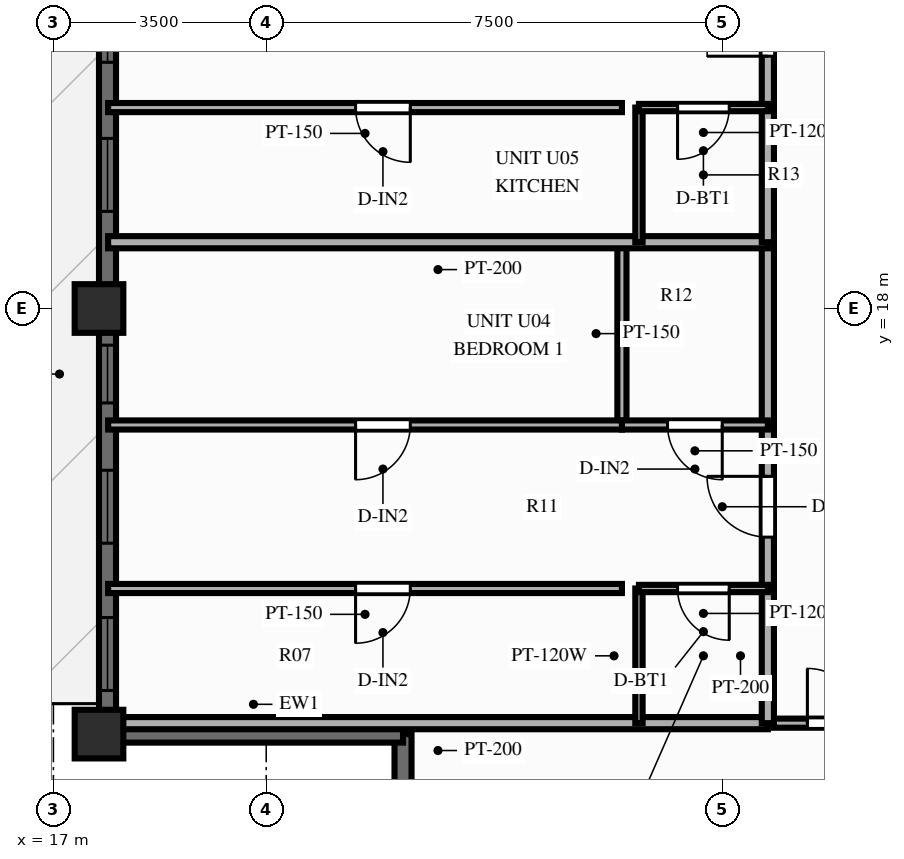
"""IFC4 building model, lengths in metres.
Left out: names, types, materials, properties, quantities, classifications, styles, units other than length and angle.
Written with IfcOpenShell. Run it as: python <this file> out.ifc"""

import sys

from ifc_helpers import new_model, si_unit, direction, frame, frame_2d, origin, origin_2d, place, context, subcontext, project, spatial, rectangle, extrude, source, transform, mapped, element, fill, save


model = new_model("IFC4")
c1 = context("Model", 3, precision=1e-05, world=origin(), true_north=direction((0.0, 1.0)))
c2 = subcontext(c1, "Body", "Model", "MODEL_VIEW")
j1 = project(units=[si_unit("LENGTHUNIT", "METRE"), si_unit("PLANEANGLEUNIT", "RADIAN")], contexts=[c1])
p1 = place(None, origin())
s1 = spatial("IfcSite", under=j1, at=p1, CompositionType="ELEMENT")
p2 = place(p1, origin())
s2 = spatial("IfcBuilding", under=s1, at=p2, CompositionType="ELEMENT")
p3 = place(p2, frame((0.0, 0.0, 189.7)))
s3 = spatial("IfcBuildingStorey", under=s2, at=p3, CompositionType="ELEMENT", Elevation=189.7)
m1 = source(origin(), c2, "Body", "SweptSolid", [
    extrude(rectangle(XDim=0.8, YDim=0.8, at=origin_2d()), origin(), (0.0, 0.0, 1.0), 3.0),
])
for number, where, z_axis, x_axis in (
    (1, (17.75, 18.0, 0.0), (0.0, 0.0, 1.0), (1.0, 0.0, 0.0)),
    (2, (17.75, 11.0, 0.0), (0.0, 0.0, 1.0), (1.0, 0.0, 0.0)),
):
    element("IfcColumn", number, at=place(p3, frame(where, z_axis=z_axis, x_axis=x_axis)), inside=s3, PredefinedType="COLUMN", context=c2, shape_type="MappedRepresentation", body=[
        mapped(m1, transform((0.0, 0.0, 0.0), scale=1.0)),
    ])
p4 = place(p3, frame((17.89, 11.0, 0.0), z_axis=(0.0, 0.0, 1.0), x_axis=(0.0, 1.0, 0.0)))
e3 = element("IfcWall", 3, at=p4, inside=s3, PredefinedType="SOLIDWALL", context=c2, shape_type="SweptSolid", body=[
    extrude(rectangle(XDim=32.0, YDim=0.28, at=frame_2d((16.0, 0.0))), origin(), (0.0, 0.0, 1.0), 2.28),
])
p5 = place(p4, frame((0.717, 0.0, 0.25)))
e4 = element("IfcOpeningElement", 4, at=p5, cuts=e3, PredefinedType="OPENING", context=c2, shape_type="SweptSolid", body=[
    extrude(rectangle(XDim=1.2, YDim=1.5, at=frame_2d((0.6, 0.75))), frame((0.0, 0.152, 0.0), z_axis=(0.0, -1.0, 0.0), x_axis=(1.0, 0.0, 0.0)), (0.0, 0.0, 1.0), 0.304),
])
p6 = place(p4, frame((3.139, 0.0, 0.25)))
e5 = element("IfcOpeningElement", 5, at=p6, cuts=e3, PredefinedType="OPENING", context=c2, shape_type="SweptSolid", body=[
    extrude(rectangle(XDim=1.2, YDim=1.5, at=frame_2d((0.6, 0.75))), frame((0.0, 0.152, 0.0), z_axis=(0.0, -1.0, 0.0), x_axis=(1.0, 0.0, 0.0)), (0.0, 0.0, 1.0), 0.304),
])
p7 = place(p4, frame((5.447, 0.0, 0.25)))
e6 = element("IfcOpeningElement", 6, at=p7, cuts=e3, PredefinedType="OPENING", context=c2, shape_type="SweptSolid", body=[
    extrude(rectangle(XDim=0.95, YDim=1.5, at=frame_2d((0.475, 0.75))), frame((0.0, 0.152, 0.0), z_axis=(0.0, -1.0, 0.0), x_axis=(1.0, 0.0, 0.0)), (0.0, 0.0, 1.0), 0.304),
])
p8 = place(p4, frame((8.597, 0.0, 0.25)))
e7 = element("IfcOpeningElement", 7, at=p8, cuts=e3, PredefinedType="OPENING", context=c2, shape_type="SweptSolid", body=[
    extrude(rectangle(XDim=1.2, YDim=1.5, at=frame_2d((0.6, 0.75))), frame((0.0, 0.152, 0.0), z_axis=(0.0, -1.0, 0.0), x_axis=(1.0, 0.0, 0.0)), (0.0, 0.0, 1.0), 0.304),
])
p9 = place(p4, frame((11.05, 0.0, 0.25)))
e8 = element("IfcOpeningElement", 8, at=p9, cuts=e3, PredefinedType="OPENING", context=c2, shape_type="SweptSolid", body=[
    extrude(rectangle(XDim=1.2, YDim=1.5, at=frame_2d((0.6, 0.75))), frame((0.0, 0.152, 0.0), z_axis=(0.0, -1.0, 0.0), x_axis=(1.0, 0.0, 0.0)), (0.0, 0.0, 1.0), 0.304),
])
p10 = place(p4, frame((13.697, 0.0, 0.0)))
e9 = element("IfcOpeningElement", 9, at=p10, cuts=e3, PredefinedType="OPENING", context=c2, shape_type="SweptSolid", body=[
    extrude(rectangle(XDim=1.6, YDim=2.15, at=frame_2d((0.8, 1.075))), frame((0.0, 0.152, 0.0), z_axis=(0.0, -1.0, 0.0), x_axis=(1.0, 0.0, 0.0)), (0.0, 0.0, 1.0), 0.304),
])
p11 = place(p4, frame((16.507, 0.0, 0.25)))
e10 = element("IfcOpeningElement", 10, at=p11, cuts=e3, PredefinedType="OPENING", context=c2, shape_type="SweptSolid", body=[
    extrude(rectangle(XDim=1.2, YDim=1.5, at=frame_2d((0.6, 0.75))), frame((0.0, 0.152, 0.0), z_axis=(0.0, -1.0, 0.0), x_axis=(1.0, 0.0, 0.0)), (0.0, 0.0, 1.0), 0.304),
])
p12 = place(p4, frame((18.959, 0.0, 0.25)))
e11 = element("IfcOpeningElement", 11, at=p12, cuts=e3, PredefinedType="OPENING", context=c2, shape_type="SweptSolid", body=[
    extrude(rectangle(XDim=1.2, YDim=1.5, at=frame_2d((0.6, 0.75))), frame((0.0, 0.152, 0.0), z_axis=(0.0, -1.0, 0.0), x_axis=(1.0, 0.0, 0.0)), (0.0, 0.0, 1.0), 0.304),
])
p13 = place(p4, frame((21.807, 0.0, 0.25)))
e12 = element("IfcOpeningElement", 12, at=p13, cuts=e3, PredefinedType="OPENING", context=c2, shape_type="SweptSolid", body=[
    extrude(rectangle(XDim=1.2, YDim=1.5, at=frame_2d((0.6, 0.75))), frame((0.0, 0.152, 0.0), z_axis=(0.0, -1.0, 0.0), x_axis=(1.0, 0.0, 0.0)), (0.0, 0.0, 1.0), 0.304),
])
p14 = place(p4, frame((26.967, 0.0, 0.25)))
e13 = element("IfcOpeningElement", 13, at=p14, cuts=e3, PredefinedType="OPENING", context=c2, shape_type="SweptSolid", body=[
    extrude(rectangle(XDim=1.2, YDim=1.5, at=frame_2d((0.6, 0.75))), frame((0.0, 0.152, 0.0), z_axis=(0.0, -1.0, 0.0), x_axis=(1.0, 0.0, 0.0)), (0.0, 0.0, 1.0), 0.304),
])
p15 = place(p4, frame((29.687, 0.0, 0.25)))
e14 = element("IfcOpeningElement", 14, at=p15, cuts=e3, PredefinedType="OPENING", context=c2, shape_type="SweptSolid", body=[
    extrude(rectangle(XDim=1.2, YDim=1.5, at=frame_2d((0.6, 0.75))), frame((0.0, 0.152, 0.0), z_axis=(0.0, -1.0, 0.0), x_axis=(1.0, 0.0, 0.0)), (0.0, 0.0, 1.0), 0.304),
])
for number, where, z_axis, x_axis in (
    (15, (22.75, 6.08, 0.0), (0.0, 0.0, 1.0), (0.0, 1.0, 0.0)),
    (16, (17.83, 11.0, 0.0), (0.0, 0.0, 1.0), (1.0, 0.0, 0.0)),
):
    element("IfcWall", number, at=place(p3, frame(where, z_axis=z_axis, x_axis=x_axis)), inside=s3, PredefinedType="SOLIDWALL", context=c2, shape_type="SweptSolid", body=[
        extrude(rectangle(XDim=4.92, YDim=0.28, at=frame_2d((2.46, 0.0))), origin(), (0.0, 0.0, 1.0), 2.28),
    ])
p16 = place(p3, frame((28.85, 11.18, 0.0), z_axis=(0.0, 0.0, 1.0), x_axis=(1.0, 0.0, 0.0)))
e17 = element("IfcWall", 17, at=p16, inside=s3, PredefinedType="PARTITIONING", context=c2, shape_type="SweptSolid", body=[
    extrude(rectangle(XDim=2.33, YDim=0.15, at=frame_2d((1.165, 0.0))), origin(), (0.0, 0.0, 1.0), 2.79),
])
p17 = place(p16, frame((0.55, 0.0, 0.0)))
e18 = element("IfcOpeningElement", 18, at=p17, cuts=e17, PredefinedType="OPENING", context=c2, shape_type="SweptSolid", body=[
    extrude(rectangle(XDim=0.9, YDim=2.1, at=frame_2d((0.45, 1.05))), frame((0.0, 0.087, 0.0), z_axis=(0.0, -1.0, 0.0), x_axis=(1.0, 0.0, 0.0)), (0.0, 0.0, 1.0), 0.174),
])
p18 = place(p3, frame((28.75, 11.18, 0.0), z_axis=(0.0, 0.0, 1.0), x_axis=(-1.0, 0.0, 0.0)))
e19 = element("IfcWall", 19, at=p18, inside=s3, PredefinedType="PARTITIONING", context=c2, shape_type="SweptSolid", body=[
    extrude(rectangle(XDim=10.85, YDim=0.2, at=frame_2d((5.425, 0.0))), origin(), (0.0, 0.0, 1.0), 2.79),
])
p19 = place(p3, frame((28.75, 11.18, 0.0), z_axis=(0.0, 0.0, 1.0), x_axis=(0.0, 1.0, 0.0)))
e20 = element("IfcWall", 20, at=p19, inside=s3, PredefinedType="PARTITIONING", context=c2, shape_type="SweptSolid", body=[
    extrude(rectangle(XDim=2.215, YDim=0.2, at=frame_2d((1.107, 0.0))), origin(), (0.0, 0.0, 1.0), 2.79),
])
p20 = place(p3, frame((28.75, 13.395, 0.0), z_axis=(0.0, 0.0, 1.0), x_axis=(0.0, 1.0, 0.0)))
e21 = element("IfcWall", 21, at=p20, inside=s3, PredefinedType="PARTITIONING", context=c2, shape_type="SweptSolid", body=[
    extrude(rectangle(XDim=2.689, YDim=0.2, at=frame_2d((1.345, 0.0))), origin(), (0.0, 0.0, 1.0), 2.79),
])
p21 = place(p20, frame((0.845, 0.0, 0.0)))
e22 = element("IfcOpeningElement", 22, at=p21, cuts=e21, PredefinedType="OPENING", context=c2, shape_type="SweptSolid", body=[
    extrude(rectangle(XDim=1.0, YDim=2.15, at=frame_2d((0.5, 1.075))), frame((0.0, 0.112, 0.0), z_axis=(0.0, -1.0, 0.0), x_axis=(1.0, 0.0, 0.0)), (0.0, 0.0, 1.0), 0.224),
])
p22 = place(p3, frame((28.75, 16.084, 0.0), z_axis=(0.0, 0.0, 1.0), x_axis=(0.0, 1.0, 0.0)))
e23 = element("IfcWall", 23, at=p22, inside=s3, PredefinedType="PARTITIONING", context=c2, shape_type="SweptSolid", body=[
    extrude(rectangle(XDim=3.006, YDim=0.2, at=frame_2d((1.503, 0.0))), origin(), (0.0, 0.0, 1.0), 2.79),
])
p23 = place(p3, frame((26.63, 11.18, 0.0), z_axis=(0.0, 0.0, 1.0), x_axis=(0.0, 1.0, 0.0)))
e24 = element("IfcWall", 24, at=p23, inside=s3, PredefinedType="PARTITIONING", context=c2, shape_type="SweptSolid", body=[
    extrude(rectangle(XDim=2.215, YDim=0.12, at=frame_2d((1.107, 0.0))), origin(), (0.0, 0.0, 1.0), 2.79),
])
p24 = place(p3, frame((26.35, 16.084, 0.0), z_axis=(0.0, 0.0, 1.0), x_axis=(0.0, 1.0, 0.0)))
e25 = element("IfcWall", 25, at=p24, inside=s3, PredefinedType="PARTITIONING", context=c2, shape_type="SweptSolid", body=[
    extrude(rectangle(XDim=3.006, YDim=0.15, at=frame_2d((1.503, 0.0))), origin(), (0.0, 0.0, 1.0), 2.79),
])
p25 = place(p3, frame((28.75, 13.395, 0.0), z_axis=(0.0, 0.0, 1.0), x_axis=(-1.0, 0.0, 0.0)))
e26 = element("IfcWall", 26, at=p25, inside=s3, PredefinedType="PARTITIONING", context=c2, shape_type="SweptSolid", body=[
    extrude(rectangle(XDim=2.12, YDim=0.12, at=frame_2d((1.06, 0.0))), origin(), (0.0, 0.0, 1.0), 2.79),
])
p26 = place(p25, frame((0.635, 0.0, 0.0)))
e27 = element("IfcOpeningElement", 27, at=p26, cuts=e26, PredefinedType="OPENING", context=c2, shape_type="SweptSolid", body=[
    extrude(rectangle(XDim=0.85, YDim=2.05, at=frame_2d((0.425, 1.025))), frame((0.0, 0.072, 0.0), z_axis=(0.0, -1.0, 0.0), x_axis=(1.0, 0.0, 0.0)), (0.0, 0.0, 1.0), 0.144),
])
p27 = place(p3, frame((26.35, 13.395, 0.0), z_axis=(0.0, 0.0, 1.0), x_axis=(-1.0, 0.0, 0.0)))
e28 = element("IfcWall", 28, at=p27, inside=s3, PredefinedType="PARTITIONING", context=c2, shape_type="SweptSolid", body=[
    extrude(rectangle(XDim=8.45, YDim=0.15, at=frame_2d((4.225, 0.0))), origin(), (0.0, 0.0, 1.0), 2.79),
])
p28 = place(p27, frame((3.48, 0.0, 0.0)))
e29 = element("IfcOpeningElement", 29, at=p28, cuts=e28, PredefinedType="OPENING", context=c2, shape_type="SweptSolid", body=[
    extrude(rectangle(XDim=0.9, YDim=2.1, at=frame_2d((0.45, 1.05))), frame((0.0, 0.087, 0.0), z_axis=(0.0, -1.0, 0.0), x_axis=(1.0, 0.0, 0.0)), (0.0, 0.0, 1.0), 0.174),
])
p29 = place(p3, frame((28.75, 16.084, 0.0), z_axis=(0.0, 0.0, 1.0), x_axis=(-1.0, 0.0, 0.0)))
e30 = element("IfcWall", 30, at=p29, inside=s3, PredefinedType="PARTITIONING", context=c2, shape_type="SweptSolid", body=[
    extrude(rectangle(XDim=2.4, YDim=0.15, at=frame_2d((1.2, 0.0))), origin(), (0.0, 0.0, 1.0), 2.79),
])
p30 = place(p29, frame((0.75, 0.0, 0.0)))
e31 = element("IfcOpeningElement", 31, at=p30, cuts=e30, PredefinedType="OPENING", context=c2, shape_type="SweptSolid", body=[
    extrude(rectangle(XDim=0.9, YDim=2.1, at=frame_2d((0.45, 1.05))), frame((0.0, 0.087, 0.0), z_axis=(0.0, -1.0, 0.0), x_axis=(1.0, 0.0, 0.0)), (0.0, 0.0, 1.0), 0.174),
])
p31 = place(p3, frame((26.35, 16.084, 0.0), z_axis=(0.0, 0.0, 1.0), x_axis=(-1.0, 0.0, 0.0)))
e32 = element("IfcWall", 32, at=p31, inside=s3, PredefinedType="PARTITIONING", context=c2, shape_type="SweptSolid", body=[
    extrude(rectangle(XDim=8.45, YDim=0.15, at=frame_2d((4.225, 0.0))), origin(), (0.0, 0.0, 1.0), 2.79),
])
p32 = place(p31, frame((3.48, 0.0, 0.0)))
e33 = element("IfcOpeningElement", 33, at=p32, cuts=e32, PredefinedType="OPENING", context=c2, shape_type="SweptSolid", body=[
    extrude(rectangle(XDim=0.9, YDim=2.1, at=frame_2d((0.45, 1.05))), frame((0.0, 0.087, 0.0), z_axis=(0.0, -1.0, 0.0), x_axis=(1.0, 0.0, 0.0)), (0.0, 0.0, 1.0), 0.174),
])
p33 = place(p3, frame((28.75, 19.09, 0.0), z_axis=(0.0, 0.0, 1.0), x_axis=(-1.0, 0.0, 0.0)))
e34 = element("IfcWall", 34, at=p33, inside=s3, PredefinedType="PARTITIONING", context=c2, shape_type="SweptSolid", body=[
    extrude(rectangle(XDim=10.85, YDim=0.2, at=frame_2d((5.425, 0.0))), origin(), (0.0, 0.0, 1.0), 2.79),
])
p34 = place(p3, frame((28.75, 19.09, 0.0), z_axis=(0.0, 0.0, 1.0), x_axis=(0.0, 1.0, 0.0)))
e35 = element("IfcWall", 35, at=p34, inside=s3, PredefinedType="PARTITIONING", context=c2, shape_type="SweptSolid", body=[
    extrude(rectangle(XDim=2.215, YDim=0.2, at=frame_2d((1.107, 0.0))), origin(), (0.0, 0.0, 1.0), 2.79),
])
p35 = place(p3, frame((28.75, 21.305, 0.0), z_axis=(0.0, 0.0, 1.0), x_axis=(0.0, 1.0, 0.0)))
e36 = element("IfcWall", 36, at=p35, inside=s3, PredefinedType="PARTITIONING", context=c2, shape_type="SweptSolid", body=[
    extrude(rectangle(XDim=2.689, YDim=0.2, at=frame_2d((1.345, 0.0))), origin(), (0.0, 0.0, 1.0), 2.79),
])
p36 = place(p35, frame((0.845, 0.0, 0.0)))
e37 = element("IfcOpeningElement", 37, at=p36, cuts=e36, PredefinedType="OPENING", context=c2, shape_type="SweptSolid", body=[
    extrude(rectangle(XDim=1.0, YDim=2.15, at=frame_2d((0.5, 1.075))), frame((0.0, 0.112, 0.0), z_axis=(0.0, -1.0, 0.0), x_axis=(1.0, 0.0, 0.0)), (0.0, 0.0, 1.0), 0.224),
])
p37 = place(p3, frame((26.63, 19.09, 0.0), z_axis=(0.0, 0.0, 1.0), x_axis=(0.0, 1.0, 0.0)))
e38 = element("IfcWall", 38, at=p37, inside=s3, PredefinedType="PARTITIONING", context=c2, shape_type="SweptSolid", body=[
    extrude(rectangle(XDim=2.215, YDim=0.12, at=frame_2d((1.107, 0.0))), origin(), (0.0, 0.0, 1.0), 2.79),
])
p38 = place(p3, frame((28.75, 21.305, 0.0), z_axis=(0.0, 0.0, 1.0), x_axis=(-1.0, 0.0, 0.0)))
e39 = element("IfcWall", 39, at=p38, inside=s3, PredefinedType="PARTITIONING", context=c2, shape_type="SweptSolid", body=[
    extrude(rectangle(XDim=2.12, YDim=0.12, at=frame_2d((1.06, 0.0))), origin(), (0.0, 0.0, 1.0), 2.79),
])
p39 = place(p38, frame((0.635, 0.0, 0.0)))
e40 = element("IfcOpeningElement", 40, at=p39, cuts=e39, PredefinedType="OPENING", context=c2, shape_type="SweptSolid", body=[
    extrude(rectangle(XDim=0.85, YDim=2.05, at=frame_2d((0.425, 1.025))), frame((0.0, 0.072, 0.0), z_axis=(0.0, -1.0, 0.0), x_axis=(1.0, 0.0, 0.0)), (0.0, 0.0, 1.0), 0.144),
])
p40 = place(p3, frame((26.35, 21.305, 0.0), z_axis=(0.0, 0.0, 1.0), x_axis=(-1.0, 0.0, 0.0)))
e41 = element("IfcWall", 41, at=p40, inside=s3, PredefinedType="PARTITIONING", context=c2, shape_type="SweptSolid", body=[
    extrude(rectangle(XDim=8.45, YDim=0.15, at=frame_2d((4.225, 0.0))), origin(), (0.0, 0.0, 1.0), 2.79),
])
p41 = place(p40, frame((3.48, 0.0, 0.0)))
e42 = element("IfcOpeningElement", 42, at=p41, cuts=e41, PredefinedType="OPENING", context=c2, shape_type="SweptSolid", body=[
    extrude(rectangle(XDim=0.9, YDim=2.1, at=frame_2d((0.45, 1.05))), frame((0.0, 0.087, 0.0), z_axis=(0.0, -1.0, 0.0), x_axis=(1.0, 0.0, 0.0)), (0.0, 0.0, 1.0), 0.174),
])
m2 = source(origin(), c2, "Body", "SweptSolid", [
    extrude(rectangle(XDim=1.2, YDim=1.5, at=frame_2d((0.6, 0.75))), frame((0.0, 0.03, 0.0), z_axis=(0.0, -1.0, 0.0), x_axis=(1.0, 0.0, 0.0)), (0.0, 0.0, 1.0), 0.06),
])
p42 = place(p5, origin())
e43 = element("IfcWindow", 43, at=p42, inside=s3, PartitioningType="SINGLE_PANEL", PredefinedType="WINDOW", context=c2, shape_type="MappedRepresentation", body=[
    mapped(m2, transform((0.0, 0.0, 0.0), scale=1.0)),
])
fill(e4, e43)
p43 = place(p6, origin())
e44 = element("IfcWindow", 44, at=p43, inside=s3, PartitioningType="SINGLE_PANEL", PredefinedType="WINDOW", context=c2, shape_type="MappedRepresentation", body=[
    mapped(m2, transform((0.0, 0.0, 0.0), scale=1.0)),
])
fill(e5, e44)
m3 = source(origin(), c2, "Body", "SweptSolid", [
    extrude(rectangle(XDim=0.95, YDim=1.5, at=frame_2d((0.475, 0.75))), frame((0.0, 0.03, 0.0), z_axis=(0.0, -1.0, 0.0), x_axis=(1.0, 0.0, 0.0)), (0.0, 0.0, 1.0), 0.06),
])
p44 = place(p7, origin())
e45 = element("IfcWindow", 45, at=p44, inside=s3, PartitioningType="SINGLE_PANEL", PredefinedType="WINDOW", context=c2, shape_type="MappedRepresentation", body=[
    mapped(m3, transform((0.0, 0.0, 0.0), scale=1.0)),
])
fill(e6, e45)
p45 = place(p8, origin())
e46 = element("IfcWindow", 46, at=p45, inside=s3, PartitioningType="SINGLE_PANEL", PredefinedType="WINDOW", context=c2, shape_type="MappedRepresentation", body=[
    mapped(m2, transform((0.0, 0.0, 0.0), scale=1.0)),
])
fill(e7, e46)
p46 = place(p9, origin())
e47 = element("IfcWindow", 47, at=p46, inside=s3, PartitioningType="SINGLE_PANEL", PredefinedType="WINDOW", context=c2, shape_type="MappedRepresentation", body=[
    mapped(m2, transform((0.0, 0.0, 0.0), scale=1.0)),
])
fill(e8, e47)
m4 = source(origin(), c2, "Body", "SweptSolid", [
    extrude(rectangle(XDim=0.9, YDim=2.1, at=frame_2d((0.45, 1.05))), frame((0.0, 0.025, 0.0), z_axis=(0.0, -1.0, 0.0), x_axis=(1.0, 0.0, 0.0)), (0.0, 0.0, 1.0), 0.05),
])
p47 = place(p17, origin())
e48 = element("IfcDoor", 48, at=p47, inside=s3, OperationType="SINGLE_SWING_LEFT", PredefinedType="DOOR", context=c2, shape_type="MappedRepresentation", body=[
    mapped(m4, transform((0.0, 0.0, 0.0), scale=1.0)),
])
fill(e18, e48)
m5 = source(origin(), c2, "Body", "SweptSolid", [
    extrude(rectangle(XDim=1.0, YDim=2.15, at=frame_2d((0.5, 1.075))), frame((0.0, 0.025, 0.0), z_axis=(0.0, -1.0, 0.0), x_axis=(1.0, 0.0, 0.0)), (0.0, 0.0, 1.0), 0.05),
])
p48 = place(p21, origin())
e49 = element("IfcDoor", 49, at=p48, inside=s3, OperationType="SINGLE_SWING_RIGHT", PredefinedType="DOOR", context=c2, shape_type="MappedRepresentation", body=[
    mapped(m5, transform((0.0, 0.0, 0.0), scale=1.0)),
])
fill(e22, e49)
m6 = source(origin(), c2, "Body", "SweptSolid", [
    extrude(rectangle(XDim=0.85, YDim=2.05, at=frame_2d((0.425, 1.025))), frame((0.0, 0.025, 0.0), z_axis=(0.0, -1.0, 0.0), x_axis=(1.0, 0.0, 0.0)), (0.0, 0.0, 1.0), 0.05),
])
p49 = place(p26, origin())
e50 = element("IfcDoor", 50, at=p49, inside=s3, OperationType="SINGLE_SWING_LEFT", PredefinedType="DOOR", context=c2, shape_type="MappedRepresentation", body=[
    mapped(m6, transform((0.0, 0.0, 0.0), scale=1.0)),
])
fill(e27, e50)
p50 = place(p28, origin())
e51 = element("IfcDoor", 51, at=p50, inside=s3, OperationType="SINGLE_SWING_RIGHT", PredefinedType="DOOR", context=c2, shape_type="MappedRepresentation", body=[
    mapped(m4, transform((0.0, 0.0, 0.0), scale=1.0)),
])
fill(e29, e51)
p51 = place(p30, origin())
e52 = element("IfcDoor", 52, at=p51, inside=s3, OperationType="SINGLE_SWING_LEFT", PredefinedType="DOOR", context=c2, shape_type="MappedRepresentation", body=[
    mapped(m4, transform((0.0, 0.0, 0.0), scale=1.0)),
])
fill(e31, e52)
p52 = place(p32, origin())
e53 = element("IfcDoor", 53, at=p52, inside=s3, OperationType="SINGLE_SWING_RIGHT", PredefinedType="DOOR", context=c2, shape_type="MappedRepresentation", body=[
    mapped(m4, transform((0.0, 0.0, 0.0), scale=1.0)),
])
fill(e33, e53)
p53 = place(p36, origin())
e54 = element("IfcDoor", 54, at=p53, inside=s3, OperationType="SINGLE_SWING_LEFT", PredefinedType="DOOR", context=c2, shape_type="MappedRepresentation", body=[
    mapped(m5, transform((0.0, 0.0, 0.0), scale=1.0)),
])
fill(e37, e54)
p54 = place(p39, origin())
e55 = element("IfcDoor", 55, at=p54, inside=s3, OperationType="SINGLE_SWING_RIGHT", PredefinedType="DOOR", context=c2, shape_type="MappedRepresentation", body=[
    mapped(m6, transform((0.0, 0.0, 0.0), scale=1.0)),
])
fill(e40, e55)
p55 = place(p41, origin())
e56 = element("IfcDoor", 56, at=p55, inside=s3, OperationType="SINGLE_SWING_LEFT", PredefinedType="DOOR", context=c2, shape_type="MappedRepresentation", body=[
    mapped(m4, transform((0.0, 0.0, 0.0), scale=1.0)),
])
fill(e42, e56)
save(model, sys.argv[1])
